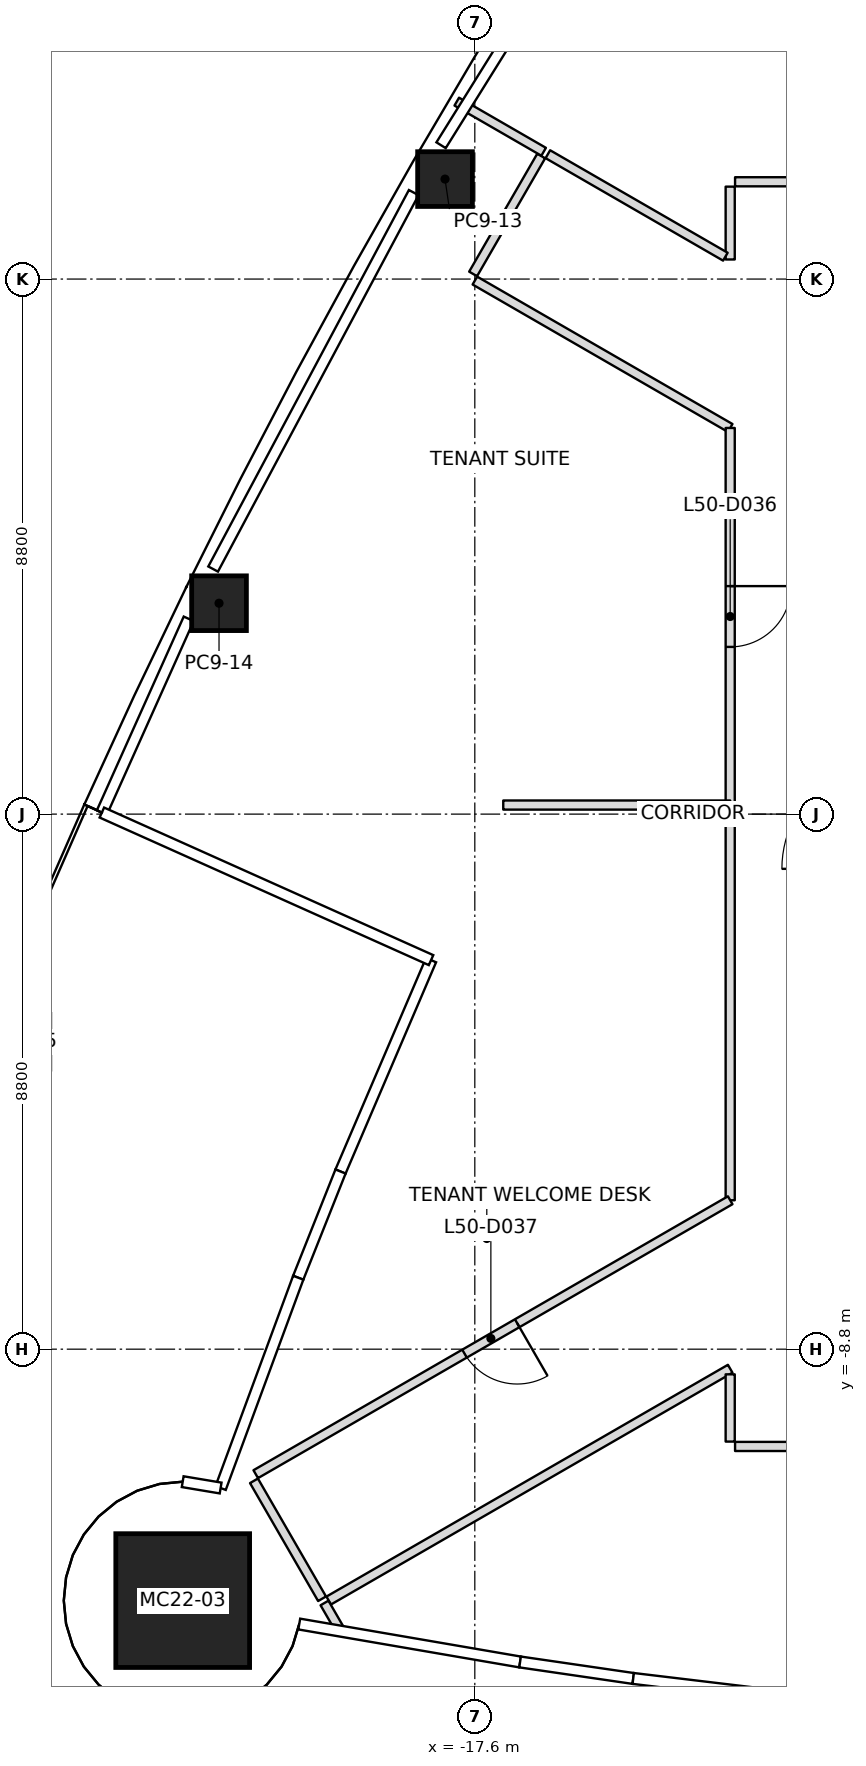
"""IFC4 building model, lengths in metres.
Left out: names, types, materials, properties, quantities, classifications, styles, units other than length and angle.
Written with IfcOpenShell. Run it as: python <this file> out.ifc"""

import sys

from ifc_helpers import new_model, si_unit, direction, frame, frame_2d, origin, origin_2d, place, context, subcontext, project, spatial, rectangle, extrude, clip, halfspace, element, fill, save


model = new_model("IFC4")
c1 = context("Model", 3, precision=1e-05, world=origin(), true_north=direction((0.0, 1.0)))
c2 = subcontext(c1, "Body", "Model", "MODEL_VIEW")
j1 = project(units=[si_unit("LENGTHUNIT", "METRE"), si_unit("PLANEANGLEUNIT", "RADIAN")], contexts=[c1])
p1 = place(None, origin())
s1 = spatial("IfcSite", under=j1, at=p1, CompositionType="ELEMENT")
p2 = place(p1, origin())
s2 = spatial("IfcBuilding", under=s1, at=p2, CompositionType="ELEMENT")
p3 = place(p2, frame((0.0, 0.0, 227.0)))
s3 = spatial("IfcBuildingStorey", under=s2, at=p3, CompositionType="ELEMENT", Elevation=227.0)
p4 = place(p3, frame((-22.404, -12.935, 0.0), z_axis=(0.027878605886, 0.016104927689, 0.999481572936), x_axis=(0.999611316129, -0.000449157512, -0.02787498742)))
e1 = element("IfcColumn", 1, at=p4, inside=s3, PredefinedType="COLUMN", context=c2, shape_type="SweptSolid", body=[
    clip(extrude(rectangle(XDim=2.2, YDim=2.2, at=origin_2d()), origin(), (0.0, 0.0, 1.0), 4.002), halfspace(frame((0.0, 0.0, 0.011)), True)),
])
p5 = place(p3, frame((-18.09, 10.444, 0.0), z_axis=(0.009948074445, -0.005736926367, 0.999934059571), x_axis=(0.499975258342, 0.8660396879, -5.385525e-06)))
e2 = element("IfcColumn", 2, at=p5, inside=s3, PredefinedType="COLUMN", context=c2, shape_type="SweptSolid", body=[
    clip(extrude(rectangle(XDim=0.9, YDim=0.9, at=origin_2d()), origin(), (0.0, 0.0, 1.0), 4.0), halfspace(frame((0.0, 0.0, 0.001)), True)),
])
p6 = place(p3, frame((-21.807, 3.469, 0.0), z_axis=(0.014036674448, 0.002013957638, 0.999899452818), x_axis=(0.439870752141, 0.898025601958, -0.007983710807)))
e3 = element("IfcColumn", 3, at=p6, inside=s3, PredefinedType="COLUMN", context=c2, shape_type="SweptSolid", body=[
    clip(extrude(rectangle(XDim=0.9, YDim=0.9, at=origin_2d()), origin(), (0.0, 0.0, 1.0), 4.0), halfspace(frame((0.0, 0.0, 0.002)), True)),
])
p7 = place(p3, frame((-25.04, -3.744, 0.0), z_axis=(0.017757540332, 0.01000768596, 0.999792236409), x_axis=(0.377729507005, 0.925778156217, -0.015975763193)))
e4 = element("IfcColumn", 4, at=p7, inside=s3, PredefinedType="COLUMN", context=c2, shape_type="SweptSolid", body=[
    clip(extrude(rectangle(XDim=0.9, YDim=0.9, at=origin_2d()), origin(), (0.0, 0.0, 1.0), 4.001), halfspace(frame((0.0, 0.0, 0.003)), True)),
])
p8 = place(p3, frame((-20.072, -12.974, 0.0), z_axis=(0.0, 0.0, 1.0), x_axis=(0.499761325023, -0.866163159002, 0.0)))
e5 = element("IfcWall", 5, at=p8, inside=s3, PredefinedType="PARTITIONING", context=c2, shape_type="SweptSolid", body=[
    extrude(rectangle(XDim=0.544, YDim=0.15, at=frame_2d((0.272, 0.0))), origin(), (0.0, 0.0, 1.0), 3.45),
])
p9 = place(p3, frame((-16.468, 10.894, 0.0), z_axis=(0.0, 0.0, 1.0), x_axis=(-0.866040211805, 0.499974350878, 0.0)))
e6 = element("IfcWall", 6, at=p9, inside=s3, PredefinedType="PARTITIONING", context=c2, shape_type="SweptSolid", body=[
    extrude(rectangle(XDim=1.65, YDim=0.15, at=frame_2d((0.825, 0.0))), origin(), (0.0, 0.0, 1.0), 3.234),
])
p10 = place(p3, frame((-13.4, 0.149, 0.0), z_axis=(0.0, 0.0, 1.0), x_axis=(-1.0, 0.0, 0.0)))
e7 = element("IfcWall", 7, at=p10, inside=s3, PredefinedType="PARTITIONING", context=c2, shape_type="SweptSolid", body=[
    extrude(rectangle(XDim=3.732, YDim=0.15, at=frame_2d((1.866, 0.0))), origin(), (0.0, 0.0, 1.0), 3.45),
])
p11 = place(p3, frame((-21.232, -10.965, 0.0), z_axis=(0.0, 0.0, 1.0), x_axis=(0.49994888933, -0.866054910533, 0.0)))
e8 = element("IfcWall", 8, at=p11, inside=s3, PredefinedType="PARTITIONING", context=c2, shape_type="SweptSolid", body=[
    extrude(rectangle(XDim=2.24, YDim=0.15, at=frame_2d((1.12, 0.0))), origin(), (0.0, 0.0, 1.0), 3.233),
])
p12 = place(p3, frame((-17.599, 8.775, 0.0), z_axis=(0.0, 0.0, 1.0), x_axis=(0.866022073929, -0.500005767435, 0.0)))
e9 = element("IfcWall", 9, at=p12, inside=s3, PredefinedType="PARTITIONING", context=c2, shape_type="SweptSolid", body=[
    extrude(rectangle(XDim=4.849, YDim=0.15, at=frame_2d((2.424, 0.0))), origin(), (0.0, 0.0, 1.0), 3.45),
])
p13 = place(p3, frame((-13.4, 6.351, 0.0), z_axis=(0.0, 0.0, 1.0), x_axis=(0.0, -1.0, 0.0)))
e10 = element("IfcWall", 10, at=p13, inside=s3, PredefinedType="PARTITIONING", context=c2, shape_type="SweptSolid", body=[
    extrude(rectangle(XDim=12.702, YDim=0.15, at=frame_2d((6.351, 0.0))), origin(), (0.0, 0.0, 1.0), 3.317),
])
p14 = place(p13, frame((2.601, 0.0, 0.0)))
e11 = element("IfcOpeningElement", 11, at=p14, cuts=e10, PredefinedType="OPENING", context=c2, shape_type="SweptSolid", body=[
    extrude(rectangle(XDim=1.0, YDim=2.1, at=frame_2d((0.5, 1.05))), frame((0.0, 0.075, 0.0), z_axis=(0.0, -1.0, 0.0), x_axis=(1.0, 0.0, 0.0)), (0.0, 0.0, 1.0), 0.15),
])
p15 = place(p3, frame((-13.4, -6.351, 0.0), z_axis=(0.0, 0.0, 1.0), x_axis=(-0.866033522472, -0.499985937757, 0.0)))
e12 = element("IfcWall", 12, at=p15, inside=s3, PredefinedType="PARTITIONING", context=c2, shape_type="SweptSolid", body=[
    extrude(rectangle(XDim=9.01, YDim=0.15, at=frame_2d((4.505, 0.0))), origin(), (0.0, 0.0, 1.0), 3.317),
])
p16 = place(p15, frame((4.045, 0.0, 0.0)))
e13 = element("IfcOpeningElement", 13, at=p16, cuts=e12, PredefinedType="OPENING", context=c2, shape_type="SweptSolid", body=[
    extrude(rectangle(XDim=1.0, YDim=2.1, at=frame_2d((0.5, 1.05))), frame((0.0, 0.075, 0.0), z_axis=(0.0, -1.0, 0.0), x_axis=(1.0, 0.0, 0.0)), (0.0, 0.0, 1.0), 0.15),
])
p17 = place(p3, frame((-20.003, -12.934, 0.0), z_axis=(0.0, 0.0, 1.0), x_axis=(0.866031477394, 0.499989480053, 0.0)))
e14 = element("IfcWall", 14, at=p17, inside=s3, PredefinedType="PARTITIONING", context=c2, shape_type="SweptSolid", body=[
    extrude(rectangle(XDim=7.624, YDim=0.15, at=frame_2d((3.812, 0.0))), origin(), (0.0, 0.0, 1.0), 3.233),
])
p18 = place(p3, frame((-13.4, -9.214, 0.0), z_axis=(0.0, 0.0, 1.0), x_axis=(0.0, -1.0, 0.0)))
e15 = element("IfcWall", 15, at=p18, inside=s3, PredefinedType="PARTITIONING", context=c2, shape_type="SweptSolid", body=[
    extrude(rectangle(XDim=1.106, YDim=0.15, at=frame_2d((0.553, 0.0))), origin(), (0.0, 0.0, 1.0), 3.233),
])
p19 = place(p3, frame((-16.508, 10.824, 0.0), z_axis=(0.0, 0.0, 1.0), x_axis=(-0.500030632641, -0.866007717299, 0.0)))
e16 = element("IfcWall", 16, at=p19, inside=s3, PredefinedType="PARTITIONING", context=c2, shape_type="SweptSolid", body=[
    extrude(rectangle(XDim=2.24, YDim=0.15, at=frame_2d((1.12, 0.0))), origin(), (0.0, 0.0, 1.0), 3.45),
])
p20 = place(p3, frame((-13.4, 10.32, 0.0), z_axis=(0.0, 0.0, 1.0), x_axis=(0.0, -1.0, 0.0)))
e17 = element("IfcWall", 17, at=p20, inside=s3, PredefinedType="PARTITIONING", context=c2, shape_type="SweptSolid", body=[
    extrude(rectangle(XDim=1.198, YDim=0.15, at=frame_2d((0.599, 0.0))), origin(), (0.0, 0.0, 1.0), 3.45),
])
p21 = place(p3, frame((-13.479, 9.168, 0.0), z_axis=(0.0, 0.0, 1.0), x_axis=(-0.866023977509, 0.500002470373, 0.0)))
e18 = element("IfcWall", 18, at=p21, inside=s3, PredefinedType="PARTITIONING", context=c2, shape_type="SweptSolid", body=[
    extrude(rectangle(XDim=3.371, YDim=0.15, at=frame_2d((1.686, 0.0))), origin(), (0.0, 0.0, 1.0), 3.45),
])
p22 = place(p3, frame((-13.32, -10.4, 0.0), z_axis=(0.0, 0.0, 1.0), x_axis=(1.0, 0.0, 0.0)))
e19 = element("IfcWall", 19, at=p22, inside=s3, PredefinedType="PARTITIONING", context=c2, shape_type="SweptSolid", body=[
    extrude(rectangle(XDim=12.12, YDim=0.15, at=frame_2d((6.06, 0.0))), origin(), (0.0, 0.0, 1.0), 3.317),
])
p23 = place(p22, frame((5.52, 0.0, 0.0)))
e20 = element("IfcOpeningElement", 20, at=p23, cuts=e19, PredefinedType="OPENING", context=c2, shape_type="SweptSolid", body=[
    extrude(rectangle(XDim=1.0, YDim=2.1, at=frame_2d((0.5, 1.05))), frame((0.0, 0.075, 0.0), z_axis=(0.0, -1.0, 0.0), x_axis=(1.0, 0.0, 0.0)), (0.0, 0.0, 1.0), 0.15),
])
p24 = place(p3, frame((-6.98, 10.4, 0.0), z_axis=(0.0, 0.0, 1.0), x_axis=(-1.0, 0.0, 0.0)))
e21 = element("IfcWall", 21, at=p24, inside=s3, PredefinedType="PARTITIONING", context=c2, shape_type="SweptSolid", body=[
    extrude(rectangle(XDim=6.34, YDim=0.15, at=frame_2d((3.17, 0.0))), origin(), (0.0, 0.0, 1.0), 3.317),
])
p25 = place(p24, frame((1.97, 0.0, 0.0)))
e22 = element("IfcOpeningElement", 22, at=p25, cuts=e21, PredefinedType="OPENING", context=c2, shape_type="SweptSolid", body=[
    extrude(rectangle(XDim=1.0, YDim=2.1, at=frame_2d((0.5, 1.05))), frame((0.0, 0.075, 0.0), z_axis=(0.0, -1.0, 0.0), x_axis=(1.0, 0.0, 0.0)), (0.0, 0.0, 1.0), 0.15),
])
p26 = place(p14, origin())
e23 = element("IfcDoor", 23, at=p26, inside=s3, OperationType="SINGLE_SWING_LEFT", PredefinedType="DOOR", context=c2, shape_type="SweptSolid", body=[
    extrude(rectangle(XDim=1.0, YDim=2.1, at=frame_2d((0.5, 1.05))), frame((0.0, 0.025, 0.0), z_axis=(0.0, -1.0, 0.0), x_axis=(1.0, 0.0, 0.0)), (0.0, 0.0, 1.0), 0.05),
])
fill(e11, e23)
p27 = place(p16, origin())
e24 = element("IfcDoor", 24, at=p27, inside=s3, OperationType="SINGLE_SWING_LEFT", PredefinedType="DOOR", context=c2, shape_type="SweptSolid", body=[
    extrude(rectangle(XDim=1.0, YDim=2.1, at=frame_2d((0.5, 1.05))), frame((0.0, 0.025, 0.0), z_axis=(0.0, -1.0, 0.0), x_axis=(1.0, 0.0, 0.0)), (0.0, 0.0, 1.0), 0.05),
])
fill(e13, e24)
save(model, sys.argv[1])
